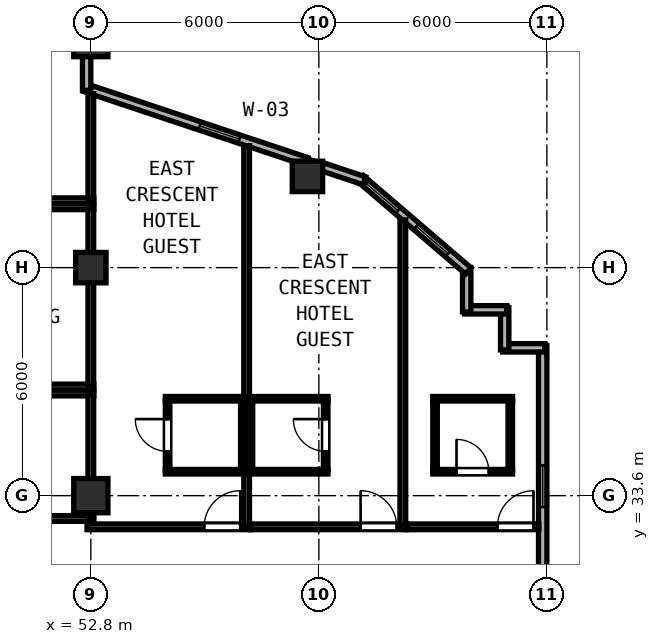
"""IFC4 building model, lengths in metres.
Left out: names, types, materials, properties, quantities, classifications, styles, units other than length and angle.
Written with IfcOpenShell. Run it as: python <this file> out.ifc"""

import sys

from ifc_helpers import new_model, si_unit, direction, frame, frame_2d, origin, origin_2d, place, context, subcontext, project, spatial, rectangle, hollow_rectangle, extrude, element, fill, save


model = new_model("IFC4")
c1 = context("Model", 3, precision=1e-05, world=origin(), true_north=direction((0.0, 1.0)))
c2 = subcontext(c1, "Body", "Model", "MODEL_VIEW")
j1 = project(units=[si_unit("LENGTHUNIT", "METRE"), si_unit("PLANEANGLEUNIT", "RADIAN")], contexts=[c1])
p1 = place(None, origin())
s1 = spatial("IfcSite", under=j1, at=p1, CompositionType="ELEMENT")
p2 = place(p1, origin())
s2 = spatial("IfcBuilding", under=s1, at=p2, CompositionType="ELEMENT")
p3 = place(p2, frame((0.0, 0.0, 223.0)))
s3 = spatial("IfcBuildingStorey", under=s2, at=p3, CompositionType="ELEMENT", Elevation=223.0)
for number, where, z_axis, x_axis in (
    (1, (52.8, 33.6, 0.0), (0.0, 0.0, 1.0), (1.0, 0.0, 0.0)),
    (2, (52.8, 45.6, 0.0), (0.0, 0.0, 1.0), (1.0, 0.0, 0.0)),
):
    element("IfcColumn", number, at=place(p3, frame(where, z_axis=z_axis, x_axis=x_axis)), inside=s3, PredefinedType="COLUMN", context=c2, shape_type="SweptSolid", body=[
        extrude(hollow_rectangle(XDim=0.9, YDim=0.9, WallThickness=0.034, at=origin_2d()), origin(), (0.0, 0.0, 1.0), 3.8),
    ])
for number, where, z_axis, x_axis in (
    (3, (52.8, 39.6, 0.0), (0.0, 0.0, 1.0), (1.0, 0.0, 0.0)),
    (4, (58.5, 42.0, 0.0), (0.0, 0.0, 1.0), (1.0, 0.0, 0.0)),
):
    element("IfcColumn", number, at=place(p3, frame(where, z_axis=z_axis, x_axis=x_axis)), inside=s3, PredefinedType="COLUMN", context=c2, shape_type="SweptSolid", body=[
        extrude(hollow_rectangle(XDim=0.8, YDim=0.8, WallThickness=0.03, at=origin_2d()), origin(), (0.0, 0.0, 1.0), 3.8),
    ])
p4 = place(p3, frame((64.69, 16.4, 0.0), z_axis=(0.0, 0.0, 1.0), x_axis=(0.0, 1.0, 0.0)))
e5 = element("IfcWall", 5, at=p4, inside=s3, PredefinedType="SOLIDWALL", context=c2, shape_type="SweptSolid", body=[
    extrude(rectangle(XDim=21.145, YDim=0.22, at=frame_2d((10.573, 0.0))), origin(), (0.0, 0.0, 1.0), 3.62),
])
p5 = place(p4, frame((1.05, 0.0, 0.85)))
e6 = element("IfcOpeningElement", 6, at=p5, cuts=e5, PredefinedType="OPENING", context=c2, shape_type="SweptSolid", body=[
    extrude(rectangle(XDim=1.1, YDim=1.75, at=frame_2d((0.55, 0.875))), frame((0.0, 0.12, 0.0), z_axis=(0.0, -1.0, 0.0), x_axis=(1.0, 0.0, 0.0)), (0.0, 0.0, 1.0), 0.24),
])
p6 = place(p4, frame((6.1, 0.0, 0.85)))
e7 = element("IfcOpeningElement", 7, at=p6, cuts=e5, PredefinedType="OPENING", context=c2, shape_type="SweptSolid", body=[
    extrude(rectangle(XDim=1.1, YDim=1.75, at=frame_2d((0.55, 0.875))), frame((0.0, 0.12, 0.0), z_axis=(0.0, -1.0, 0.0), x_axis=(1.0, 0.0, 0.0)), (0.0, 0.0, 1.0), 0.24),
])
p7 = place(p4, frame((11.85, 0.0, 0.85)))
e8 = element("IfcOpeningElement", 8, at=p7, cuts=e5, PredefinedType="OPENING", context=c2, shape_type="SweptSolid", body=[
    extrude(rectangle(XDim=1.1, YDim=1.75, at=frame_2d((0.55, 0.875))), frame((0.0, 0.12, 0.0), z_axis=(0.0, -1.0, 0.0), x_axis=(1.0, 0.0, 0.0)), (0.0, 0.0, 1.0), 0.24),
])
p8 = place(p4, frame((16.9, 0.0, 0.85)))
e9 = element("IfcOpeningElement", 9, at=p8, cuts=e5, PredefinedType="OPENING", context=c2, shape_type="SweptSolid", body=[
    extrude(rectangle(XDim=1.1, YDim=1.75, at=frame_2d((0.55, 0.875))), frame((0.0, 0.12, 0.0), z_axis=(0.0, -1.0, 0.0), x_axis=(1.0, 0.0, 0.0)), (0.0, 0.0, 1.0), 0.24),
])
p9 = place(p3, frame((64.745, 37.49, 0.0), z_axis=(0.0, 0.0, 1.0), x_axis=(-1.0, 0.0, 0.0)))
e10 = element("IfcWall", 10, at=p9, inside=s3, PredefinedType="SOLIDWALL", context=c2, shape_type="SweptSolid", body=[
    extrude(rectangle(XDim=1.11, YDim=0.22, at=frame_2d((0.555, 0.0))), origin(), (0.0, 0.0, 1.0), 3.62),
])
p10 = place(p3, frame((63.69, 37.435, 0.0), z_axis=(0.0, 0.0, 1.0), x_axis=(0.0, 1.0, 0.0)))
e11 = element("IfcWall", 11, at=p10, inside=s3, PredefinedType="SOLIDWALL", context=c2, shape_type="SweptSolid", body=[
    extrude(rectangle(XDim=1.11, YDim=0.22, at=frame_2d((0.555, 0.0))), origin(), (0.0, 0.0, 1.0), 3.62),
])
p11 = place(p3, frame((63.745, 38.49, 0.0), z_axis=(0.0, 0.0, 1.0), x_axis=(-1.0, 0.0, 0.0)))
e12 = element("IfcWall", 12, at=p11, inside=s3, PredefinedType="SOLIDWALL", context=c2, shape_type="SweptSolid", body=[
    extrude(rectangle(XDim=1.11, YDim=0.22, at=frame_2d((0.555, 0.0))), origin(), (0.0, 0.0, 1.0), 3.62),
])
p12 = place(p3, frame((62.69, 38.435, 0.0), z_axis=(0.0, 0.0, 1.0), x_axis=(0.0, 1.0, 0.0)))
e13 = element("IfcWall", 13, at=p12, inside=s3, PredefinedType="SOLIDWALL", context=c2, shape_type="SweptSolid", body=[
    extrude(rectangle(XDim=1.169, YDim=0.22, at=frame_2d((0.585, 0.0))), origin(), (0.0, 0.0, 1.0), 3.62),
])
p13 = place(p3, frame((62.732, 39.514, 0.0), z_axis=(0.0, 0.0, 1.0), x_axis=(-0.759251976569, 0.65079677018, 0.0)))
e14 = element("IfcWall", 14, at=p13, inside=s3, PredefinedType="SOLIDWALL", context=c2, shape_type="SweptSolid", body=[
    extrude(rectangle(XDim=3.726, YDim=0.22, at=frame_2d((1.863, 0.0))), origin(), (0.0, 0.0, 1.0), 3.62),
])
p14 = place(p13, frame((0.7, 0.0, 0.85)))
e15 = element("IfcOpeningElement", 15, at=p14, cuts=e14, PredefinedType="OPENING", context=c2, shape_type="SweptSolid", body=[
    extrude(rectangle(XDim=1.1, YDim=1.75, at=frame_2d((0.55, 0.875))), frame((0.0, 0.12, 0.0), z_axis=(0.0, -1.0, 0.0), x_axis=(1.0, 0.0, 0.0)), (0.0, 0.0, 1.0), 0.24),
])
p15 = place(p13, frame((2.436, 0.0, 0.85)))
e16 = element("IfcOpeningElement", 16, at=p15, cuts=e14, PredefinedType="OPENING", context=c2, shape_type="SweptSolid", body=[
    extrude(rectangle(XDim=1.1, YDim=1.75, at=frame_2d((0.55, 0.875))), frame((0.0, 0.12, 0.0), z_axis=(0.0, -1.0, 0.0), x_axis=(1.0, 0.0, 0.0)), (0.0, 0.0, 1.0), 0.24),
])
p16 = place(p3, frame((59.997, 41.885, 0.0), z_axis=(0.0, 0.0, 1.0), x_axis=(-0.948662335685, 0.316290646166, 0.0)))
e17 = element("IfcWall", 17, at=p16, inside=s3, PredefinedType="SOLIDWALL", context=c2, shape_type="SweptSolid", body=[
    extrude(rectangle(XDim=1.165, YDim=0.22, at=frame_2d((0.583, 0.0))), origin(), (0.0, 0.0, 1.0), 3.62),
])
p17 = place(p3, frame((58.476, 42.392, 0.0), z_axis=(0.0, 0.0, 1.0), x_axis=(-0.948691231611, 0.316203964339, 0.0)))
e18 = element("IfcWall", 18, at=p17, inside=s3, PredefinedType="SOLIDWALL", context=c2, shape_type="SweptSolid", body=[
    extrude(rectangle(XDim=6.154, YDim=0.22, at=frame_2d((3.077, 0.0))), origin(), (0.0, 0.0, 1.0), 3.215),
])
p18 = place(p17, frame((1.863, 0.0, 0.85)))
e19 = element("IfcOpeningElement", 19, at=p18, cuts=e18, PredefinedType="OPENING", context=c2, shape_type="SweptSolid", body=[
    extrude(rectangle(XDim=1.1, YDim=1.75, at=frame_2d((0.55, 0.875))), frame((0.0, 0.12, 0.0), z_axis=(0.0, -1.0, 0.0), x_axis=(1.0, 0.0, 0.0)), (0.0, 0.0, 1.0), 0.24),
])
p19 = place(p3, frame((52.69, 44.266, 0.0), z_axis=(0.0, 0.0, 1.0), x_axis=(0.0, 1.0, 0.0)))
e20 = element("IfcWall", 20, at=p19, inside=s3, PredefinedType="SOLIDWALL", context=c2, shape_type="SweptSolid", body=[
    extrude(rectangle(XDim=0.892, YDim=0.22, at=frame_2d((0.446, 0.0))), origin(), (0.0, 0.0, 1.0), 3.215),
])
for number, where, z_axis, x_axis in (
    (21, (49.08, 36.3, 0.0), (0.0, 0.0, 1.0), (1.0, 0.0, 0.0)),
    (22, (49.08, 33.0, 0.0), (0.0, 0.0, 1.0), (1.0, 0.0, 0.0)),
):
    element("IfcWall", number, at=place(p3, frame(where, z_axis=z_axis, x_axis=x_axis)), inside=s3, PredefinedType="PARTITIONING", context=c2, shape_type="SweptSolid", body=[
        extrude(rectangle(XDim=3.8, YDim=0.15, at=frame_2d((1.9, 0.0))), origin(), (0.0, 0.0, 1.0), 3.62),
    ])
p20 = place(p3, frame((52.8, 33.06, 0.0), z_axis=(0.0, 0.0, 1.0), x_axis=(0.0, 1.0, 0.0)))
e23 = element("IfcWall", 23, at=p20, inside=s3, PredefinedType="PARTITIONING", context=c2, shape_type="SweptSolid", body=[
    extrude(rectangle(XDim=3.18, YDim=0.15, at=frame_2d((1.59, 0.0))), origin(), (0.0, 0.0, 1.0), 3.215),
])
for number, where, z_axis, x_axis in (
    (24, (49.08, 41.2, 0.0), (0.0, 0.0, 1.0), (1.0, 0.0, 0.0)),
    (25, (49.08, 36.46, 0.0), (0.0, 0.0, 1.0), (1.0, 0.0, 0.0)),
):
    element("IfcWall", number, at=place(p3, frame(where, z_axis=z_axis, x_axis=x_axis)), inside=s3, PredefinedType="PARTITIONING", context=c2, shape_type="SweptSolid", body=[
        extrude(rectangle(XDim=3.8, YDim=0.15, at=frame_2d((1.9, 0.0))), origin(), (0.0, 0.0, 1.0), 3.62),
    ])
p21 = place(p3, frame((52.8, 36.52, 0.0), z_axis=(0.0, 0.0, 1.0), x_axis=(0.0, 1.0, 0.0)))
e26 = element("IfcWall", 26, at=p21, inside=s3, PredefinedType="PARTITIONING", context=c2, shape_type="SweptSolid", body=[
    extrude(rectangle(XDim=4.62, YDim=0.15, at=frame_2d((2.31, 0.0))), origin(), (0.0, 0.0, 1.0), 3.215),
])
p22 = place(p3, frame((49.08, 41.36, 0.0), z_axis=(0.0, 0.0, 1.0), x_axis=(1.0, 0.0, 0.0)))
e27 = element("IfcWall", 27, at=p22, inside=s3, PredefinedType="PARTITIONING", context=c2, shape_type="SweptSolid", body=[
    extrude(rectangle(XDim=3.8, YDim=0.15, at=frame_2d((1.9, 0.0))), origin(), (0.0, 0.0, 1.0), 3.62),
])
p23 = place(p3, frame((52.8, 41.42, 0.0), z_axis=(0.0, 0.0, 1.0), x_axis=(0.0, 1.0, 0.0)))
e28 = element("IfcWall", 28, at=p23, inside=s3, PredefinedType="PARTITIONING", context=c2, shape_type="SweptSolid", body=[
    extrude(rectangle(XDim=2.757, YDim=0.15, at=frame_2d((1.378, 0.0))), origin(), (0.0, 0.0, 1.0), 3.215),
])
p24 = place(p3, frame((52.7, 32.78, 0.0), z_axis=(0.0, 0.0, 1.0), x_axis=(1.0, 0.0, 0.0)))
e29 = element("IfcWall", 29, at=p24, inside=s3, PredefinedType="PARTITIONING", context=c2, shape_type="SweptSolid", body=[
    extrude(rectangle(XDim=4.3, YDim=0.15, at=frame_2d((2.15, 0.0))), origin(), (0.0, 0.0, 1.0), 3.62),
])
p25 = place(p24, frame((3.082, 0.0, 0.0)))
e30 = element("IfcOpeningElement", 30, at=p25, cuts=e29, PredefinedType="OPENING", context=c2, shape_type="SweptSolid", body=[
    extrude(rectangle(XDim=0.95, YDim=2.15, at=frame_2d((0.475, 1.075))), frame((0.0, 0.085, 0.0), z_axis=(0.0, -1.0, 0.0), x_axis=(1.0, 0.0, 0.0)), (0.0, 0.0, 1.0), 0.17),
])
p26 = place(p3, frame((56.9, 32.84, 0.0), z_axis=(0.0, 0.0, 1.0), x_axis=(0.0, 1.0, 0.0)))
e31 = element("IfcWall", 31, at=p26, inside=s3, PredefinedType="PARTITIONING", context=c2, shape_type="SweptSolid", body=[
    extrude(rectangle(XDim=9.97, YDim=0.15, at=frame_2d((4.985, 0.0))), origin(), (0.0, 0.0, 1.0), 3.62),
])
for number, where, z_axis, x_axis in (
    (32, (54.76, 36.15, 0.0), (0.0, 0.0, 1.0), (1.0, 0.0, 0.0)),
    (33, (54.76, 34.23, 0.0), (0.0, 0.0, 1.0), (1.0, 0.0, 0.0)),
):
    element("IfcWall", number, at=place(p3, frame(where, z_axis=z_axis, x_axis=x_axis)), inside=s3, PredefinedType="PARTITIONING", context=c2, shape_type="SweptSolid", body=[
        extrude(rectangle(XDim=2.08, YDim=0.12, at=frame_2d((1.04, 0.0))), origin(), (0.0, 0.0, 1.0), 3.62),
    ])
p27 = place(p3, frame((54.82, 34.275, 0.0), z_axis=(0.0, 0.0, 1.0), x_axis=(0.0, 1.0, 0.0)))
e34 = element("IfcWall", 34, at=p27, inside=s3, PredefinedType="PARTITIONING", context=c2, shape_type="SweptSolid", body=[
    extrude(rectangle(XDim=1.83, YDim=0.12, at=frame_2d((0.915, 0.0))), origin(), (0.0, 0.0, 1.0), 3.62),
])
p28 = place(p27, frame((1.34, 0.0, 0.0), z_axis=(0.0, 0.0, 1.0), x_axis=(-1.0, 0.0, 0.0)))
e35 = element("IfcOpeningElement", 35, at=p28, cuts=e34, PredefinedType="OPENING", context=c2, shape_type="SweptSolid", body=[
    extrude(rectangle(XDim=0.85, YDim=2.1, at=frame_2d((0.425, 1.05))), frame((0.0, 0.07, 0.0), z_axis=(0.0, -1.0, 0.0), x_axis=(1.0, 0.0, 0.0)), (0.0, 0.0, 1.0), 0.14),
])
p29 = place(p3, frame((56.8, 34.275, 0.0), z_axis=(0.0, 0.0, 1.0), x_axis=(0.0, 1.0, 0.0)))
e36 = element("IfcWall", 36, at=p29, inside=s3, PredefinedType="PARTITIONING", context=c2, shape_type="SweptSolid", body=[
    extrude(rectangle(XDim=1.83, YDim=0.12, at=frame_2d((0.915, 0.0))), origin(), (0.0, 0.0, 1.0), 3.62),
])
p30 = place(p3, frame((57.002, 32.78, 0.0), z_axis=(0.0, 0.0, 1.0), x_axis=(1.0, 0.0, 0.0)))
e37 = element("IfcWall", 37, at=p30, inside=s3, PredefinedType="PARTITIONING", context=c2, shape_type="SweptSolid", body=[
    extrude(rectangle(XDim=4.108, YDim=0.15, at=frame_2d((2.054, 0.0))), origin(), (0.0, 0.0, 1.0), 3.62),
])
p31 = place(p30, frame((2.896, 0.0, 0.0)))
e38 = element("IfcOpeningElement", 38, at=p31, cuts=e37, PredefinedType="OPENING", context=c2, shape_type="SweptSolid", body=[
    extrude(rectangle(XDim=0.95, YDim=2.15, at=frame_2d((0.475, 1.075))), frame((0.0, 0.085, 0.0), z_axis=(0.0, -1.0, 0.0), x_axis=(1.0, 0.0, 0.0)), (0.0, 0.0, 1.0), 0.17),
])
p32 = place(p3, frame((61.01, 32.84, 0.0), z_axis=(0.0, 0.0, 1.0), x_axis=(0.0, 1.0, 0.0)))
e39 = element("IfcWall", 39, at=p32, inside=s3, PredefinedType="PARTITIONING", context=c2, shape_type="SweptSolid", body=[
    extrude(rectangle(XDim=8.015, YDim=0.15, at=frame_2d((4.007, 0.0))), origin(), (0.0, 0.0, 1.0), 3.62),
])
for number, where, z_axis, x_axis in (
    (40, (56.96, 36.15, 0.0), (0.0, 0.0, 1.0), (1.0, 0.0, 0.0)),
    (41, (56.96, 34.23, 0.0), (0.0, 0.0, 1.0), (1.0, 0.0, 0.0)),
):
    element("IfcWall", number, at=place(p3, frame(where, z_axis=z_axis, x_axis=x_axis)), inside=s3, PredefinedType="PARTITIONING", context=c2, shape_type="SweptSolid", body=[
        extrude(rectangle(XDim=2.08, YDim=0.12, at=frame_2d((1.04, 0.0))), origin(), (0.0, 0.0, 1.0), 3.62),
    ])
p33 = place(p3, frame((57.0, 34.275, 0.0), z_axis=(0.0, 0.0, 1.0), x_axis=(0.0, 1.0, 0.0)))
e42 = element("IfcWall", 42, at=p33, inside=s3, PredefinedType="PARTITIONING", context=c2, shape_type="SweptSolid", body=[
    extrude(rectangle(XDim=1.83, YDim=0.12, at=frame_2d((0.915, 0.0))), origin(), (0.0, 0.0, 1.0), 3.62),
])
p34 = place(p3, frame((58.98, 34.275, 0.0), z_axis=(0.0, 0.0, 1.0), x_axis=(0.0, 1.0, 0.0)))
e43 = element("IfcWall", 43, at=p34, inside=s3, PredefinedType="PARTITIONING", context=c2, shape_type="SweptSolid", body=[
    extrude(rectangle(XDim=1.83, YDim=0.12, at=frame_2d((0.915, 0.0))), origin(), (0.0, 0.0, 1.0), 3.62),
])
p35 = place(p34, frame((0.49, 0.0, 0.0)))
e44 = element("IfcOpeningElement", 44, at=p35, cuts=e43, PredefinedType="OPENING", context=c2, shape_type="SweptSolid", body=[
    extrude(rectangle(XDim=0.85, YDim=2.1, at=frame_2d((0.425, 1.05))), frame((0.0, 0.07, 0.0), z_axis=(0.0, -1.0, 0.0), x_axis=(1.0, 0.0, 0.0)), (0.0, 0.0, 1.0), 0.14),
])
p36 = place(p3, frame((61.112, 32.78, 0.0), z_axis=(0.0, 0.0, 1.0), x_axis=(1.0, 0.0, 0.0)))
e45 = element("IfcWall", 45, at=p36, inside=s3, PredefinedType="PARTITIONING", context=c2, shape_type="SweptSolid", body=[
    extrude(rectangle(XDim=3.476, YDim=0.15, at=frame_2d((1.738, 0.0))), origin(), (0.0, 0.0, 1.0), 3.62),
])
p37 = place(p36, frame((2.386, 0.0, 0.0)))
e46 = element("IfcOpeningElement", 46, at=p37, cuts=e45, PredefinedType="OPENING", context=c2, shape_type="SweptSolid", body=[
    extrude(rectangle(XDim=0.95, YDim=2.15, at=frame_2d((0.475, 1.075))), frame((0.0, 0.085, 0.0), z_axis=(0.0, -1.0, 0.0), x_axis=(1.0, 0.0, 0.0)), (0.0, 0.0, 1.0), 0.17),
])
p38 = place(p3, frame((61.797, 36.15, 0.0), z_axis=(0.0, 0.0, 1.0), x_axis=(1.0, 0.0, 0.0)))
e47 = element("IfcWall", 47, at=p38, inside=s3, PredefinedType="PARTITIONING", context=c2, shape_type="SweptSolid", body=[
    extrude(rectangle(XDim=2.1, YDim=0.12, at=frame_2d((1.05, 0.0))), origin(), (0.0, 0.0, 1.0), 3.62),
])
p39 = place(p3, frame((61.797, 34.23, 0.0), z_axis=(0.0, 0.0, 1.0), x_axis=(1.0, 0.0, 0.0)))
e48 = element("IfcWall", 48, at=p39, inside=s3, PredefinedType="PARTITIONING", context=c2, shape_type="SweptSolid", body=[
    extrude(rectangle(XDim=2.1, YDim=0.12, at=frame_2d((1.05, 0.0))), origin(), (0.0, 0.0, 1.0), 3.62),
])
p40 = place(p39, frame((0.625, 0.0, 0.0)))
e49 = element("IfcOpeningElement", 49, at=p40, cuts=e48, PredefinedType="OPENING", context=c2, shape_type="SweptSolid", body=[
    extrude(rectangle(XDim=0.85, YDim=2.1, at=frame_2d((0.425, 1.05))), frame((0.0, 0.07, 0.0), z_axis=(0.0, -1.0, 0.0), x_axis=(1.0, 0.0, 0.0)), (0.0, 0.0, 1.0), 0.14),
])
for number, where, z_axis, x_axis in (
    (50, (61.857, 34.275, 0.0), (0.0, 0.0, 1.0), (0.0, 1.0, 0.0)),
    (51, (63.837, 34.275, 0.0), (0.0, 0.0, 1.0), (0.0, 1.0, 0.0)),
):
    element("IfcWall", number, at=place(p3, frame(where, z_axis=z_axis, x_axis=x_axis)), inside=s3, PredefinedType="PARTITIONING", context=c2, shape_type="SweptSolid", body=[
        extrude(rectangle(XDim=1.83, YDim=0.12, at=frame_2d((0.915, 0.0))), origin(), (0.0, 0.0, 1.0), 3.62),
    ])
p41 = place(p8, origin())
e52 = element("IfcWindow", 52, at=p41, inside=s3, PartitioningType="SINGLE_PANEL", PredefinedType="WINDOW", context=c2, shape_type="SweptSolid", body=[
    extrude(rectangle(XDim=1.1, YDim=1.75, at=frame_2d((0.55, 0.875))), frame((0.0, 0.03, 0.0), z_axis=(0.0, -1.0, 0.0), x_axis=(1.0, 0.0, 0.0)), (0.0, 0.0, 1.0), 0.06),
])
fill(e9, e52)
p42 = place(p14, origin())
e53 = element("IfcWindow", 53, at=p42, inside=s3, PartitioningType="SINGLE_PANEL", PredefinedType="WINDOW", context=c2, shape_type="SweptSolid", body=[
    extrude(rectangle(XDim=1.1, YDim=1.75, at=frame_2d((0.55, 0.875))), frame((0.0, 0.03, 0.0), z_axis=(0.0, -1.0, 0.0), x_axis=(1.0, 0.0, 0.0)), (0.0, 0.0, 1.0), 0.06),
])
fill(e15, e53)
p43 = place(p18, origin())
e54 = element("IfcWindow", 54, at=p43, inside=s3, PartitioningType="SINGLE_PANEL", PredefinedType="WINDOW", context=c2, shape_type="SweptSolid", body=[
    extrude(rectangle(XDim=1.1, YDim=1.75, at=frame_2d((0.55, 0.875))), frame((0.0, 0.03, 0.0), z_axis=(0.0, -1.0, 0.0), x_axis=(1.0, 0.0, 0.0)), (0.0, 0.0, 1.0), 0.06),
])
fill(e19, e54)
p44 = place(p25, origin())
e55 = element("IfcDoor", 55, at=p44, inside=s3, OperationType="SINGLE_SWING_RIGHT", PredefinedType="DOOR", context=c2, shape_type="SweptSolid", body=[
    extrude(rectangle(XDim=0.95, YDim=2.15, at=frame_2d((0.475, 1.075))), frame((0.0, 0.025, 0.0), z_axis=(0.0, -1.0, 0.0), x_axis=(1.0, 0.0, 0.0)), (0.0, 0.0, 1.0), 0.05),
])
fill(e30, e55)
p45 = place(p28, origin())
e56 = element("IfcDoor", 56, at=p45, inside=s3, OperationType="SINGLE_SWING_LEFT", PredefinedType="DOOR", context=c2, shape_type="SweptSolid", body=[
    extrude(rectangle(XDim=0.85, YDim=2.1, at=frame_2d((0.425, 1.05))), frame((0.0, 0.025, 0.0), z_axis=(0.0, -1.0, 0.0), x_axis=(1.0, 0.0, 0.0)), (0.0, 0.0, 1.0), 0.05),
])
fill(e35, e56)
p46 = place(p31, origin())
e57 = element("IfcDoor", 57, at=p46, inside=s3, OperationType="SINGLE_SWING_LEFT", PredefinedType="DOOR", context=c2, shape_type="SweptSolid", body=[
    extrude(rectangle(XDim=0.95, YDim=2.15, at=frame_2d((0.475, 1.075))), frame((0.0, 0.025, 0.0), z_axis=(0.0, -1.0, 0.0), x_axis=(1.0, 0.0, 0.0)), (0.0, 0.0, 1.0), 0.05),
])
fill(e38, e57)
p47 = place(p35, origin())
e58 = element("IfcDoor", 58, at=p47, inside=s3, OperationType="SINGLE_SWING_RIGHT", PredefinedType="DOOR", context=c2, shape_type="SweptSolid", body=[
    extrude(rectangle(XDim=0.85, YDim=2.1, at=frame_2d((0.425, 1.05))), frame((0.0, 0.025, 0.0), z_axis=(0.0, -1.0, 0.0), x_axis=(1.0, 0.0, 0.0)), (0.0, 0.0, 1.0), 0.05),
])
fill(e44, e58)
p48 = place(p37, origin())
e59 = element("IfcDoor", 59, at=p48, inside=s3, OperationType="SINGLE_SWING_RIGHT", PredefinedType="DOOR", context=c2, shape_type="SweptSolid", body=[
    extrude(rectangle(XDim=0.95, YDim=2.15, at=frame_2d((0.475, 1.075))), frame((0.0, 0.025, 0.0), z_axis=(0.0, -1.0, 0.0), x_axis=(1.0, 0.0, 0.0)), (0.0, 0.0, 1.0), 0.05),
])
fill(e46, e59)
p49 = place(p40, origin())
e60 = element("IfcDoor", 60, at=p49, inside=s3, OperationType="SINGLE_SWING_LEFT", PredefinedType="DOOR", context=c2, shape_type="SweptSolid", body=[
    extrude(rectangle(XDim=0.85, YDim=2.1, at=frame_2d((0.425, 1.05))), frame((0.0, 0.025, 0.0), z_axis=(0.0, -1.0, 0.0), x_axis=(1.0, 0.0, 0.0)), (0.0, 0.0, 1.0), 0.05),
])
fill(e49, e60)
p50 = place(p15, origin())
e61 = element("IfcWindow", 61, at=p50, inside=s3, PartitioningType="SINGLE_PANEL", PredefinedType="WINDOW", context=c2, shape_type="SweptSolid", body=[
    extrude(rectangle(XDim=1.1, YDim=1.75, at=frame_2d((0.55, 0.875))), frame((0.0, 0.03, 0.0), z_axis=(0.0, -1.0, 0.0), x_axis=(1.0, 0.0, 0.0)), (0.0, 0.0, 1.0), 0.06),
])
fill(e16, e61)
save(model, sys.argv[1])
